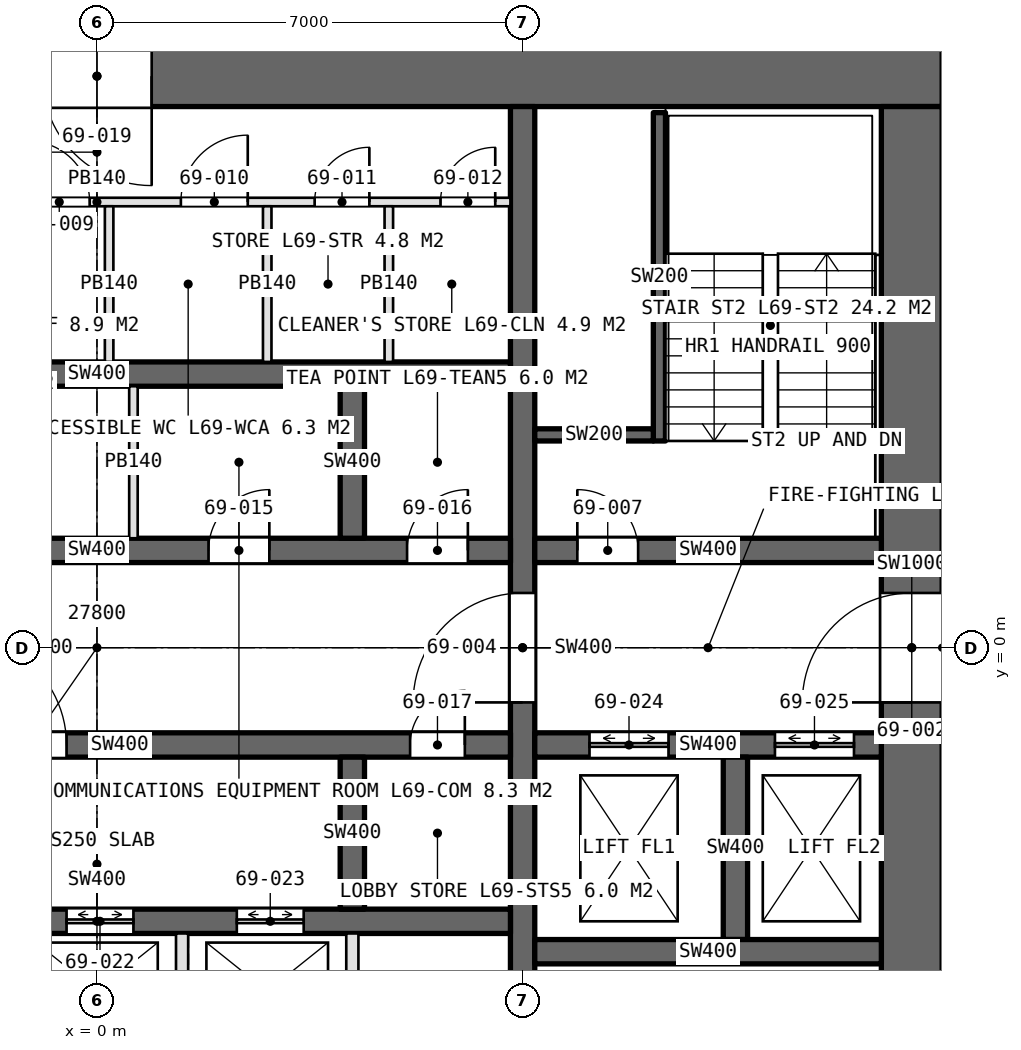
"""IFC4 building model, lengths in metres.
Left out: names, types, materials, properties, quantities, classifications, styles, units other than length and angle.
Written with IfcOpenShell. Run it as: python <this file> out.ifc"""

import sys

from ifc_helpers import new_model, si_unit, direction, frame, frame_2d, origin, place, context, subcontext, project, spatial, rectangle, extrude, element, fill, save


model = new_model("IFC4")
c1 = context("Model", 3, precision=1e-05, world=origin(), true_north=direction((0.0, 1.0)))
c2 = subcontext(c1, "Body", "Model", "MODEL_VIEW")
j1 = project(units=[si_unit("LENGTHUNIT", "METRE"), si_unit("PLANEANGLEUNIT", "RADIAN")], contexts=[c1])
p1 = place(None, origin())
s1 = spatial("IfcSite", under=j1, at=p1, CompositionType="ELEMENT")
p2 = place(p1, origin())
s2 = spatial("IfcBuilding", under=s1, at=p2, CompositionType="ELEMENT")
p3 = place(p2, frame((0.0, 0.0, 309.0)))
s3 = spatial("IfcBuildingStorey", under=s2, at=p3, CompositionType="ELEMENT", Elevation=309.0)
p4 = place(p3, frame((13.9, 9.4, 0.0), z_axis=(0.0, 0.0, 1.0), x_axis=(-1.0, 0.0, 0.0)))
e1 = element("IfcWall", 1, at=p4, inside=s3, PredefinedType="SHEAR", context=c2, shape_type="SweptSolid", body=[
    extrude(rectangle(XDim=27.8, YDim=1.0, at=frame_2d((13.9, 0.0))), origin(), (0.0, 0.0, 1.0), 4.2),
])
p5 = place(p4, frame((23.9, 0.0, 0.0)))
e2 = element("IfcOpeningElement", 2, at=p5, cuts=e1, PredefinedType="OPENING", context=c2, shape_type="SweptSolid", body=[
    extrude(rectangle(XDim=1.0, YDim=2.4, at=frame_2d((0.5, 1.2))), frame((0.0, 0.51, 0.0), z_axis=(0.0, -1.0, 0.0), x_axis=(1.0, 0.0, 0.0)), (0.0, 0.0, 1.0), 1.02),
])
p6 = place(p4, frame((13.0, 0.0, 0.0)))
e3 = element("IfcOpeningElement", 3, at=p6, cuts=e1, PredefinedType="OPENING", context=c2, shape_type="SweptSolid", body=[
    extrude(rectangle(XDim=1.8, YDim=2.4, at=frame_2d((0.9, 1.2))), frame((0.0, 0.51, 0.0), z_axis=(0.0, -1.0, 0.0), x_axis=(1.0, 0.0, 0.0)), (0.0, 0.0, 1.0), 1.02),
])
p7 = place(p3, frame((13.4, -8.9, 0.0), z_axis=(0.0, 0.0, 1.0), x_axis=(0.0, 1.0, 0.0)))
e4 = element("IfcWall", 4, at=p7, inside=s3, PredefinedType="SHEAR", context=c2, shape_type="SweptSolid", body=[
    extrude(rectangle(XDim=17.8, YDim=1.0, at=frame_2d((8.9, 0.0))), origin(), (0.0, 0.0, 1.0), 4.2),
])
p8 = place(p7, frame((8.0, 0.0, 0.0)))
e5 = element("IfcOpeningElement", 5, at=p8, cuts=e4, PredefinedType="OPENING", context=c2, shape_type="SweptSolid", body=[
    extrude(rectangle(XDim=1.8, YDim=2.4, at=frame_2d((0.9, 1.2))), frame((0.0, 0.51, 0.0), z_axis=(0.0, -1.0, 0.0), x_axis=(1.0, 0.0, 0.0)), (0.0, 0.0, 1.0), 1.02),
])
p9 = place(p3, frame((7.0, -8.9, 0.0), z_axis=(0.0, 0.0, 1.0), x_axis=(0.0, 1.0, 0.0)))
e6 = element("IfcWall", 6, at=p9, inside=s3, PredefinedType="SHEAR", context=c2, shape_type="SweptSolid", body=[
    extrude(rectangle(XDim=17.8, YDim=0.4, at=frame_2d((8.9, 0.0))), origin(), (0.0, 0.0, 1.0), 4.2),
])
p10 = place(p9, frame((8.0, 0.0, 0.0)))
e7 = element("IfcOpeningElement", 7, at=p10, cuts=e6, PredefinedType="OPENING", context=c2, shape_type="SweptSolid", body=[
    extrude(rectangle(XDim=1.8, YDim=2.4, at=frame_2d((0.9, 1.2))), frame((0.0, 0.21, 0.0), z_axis=(0.0, -1.0, 0.0), x_axis=(1.0, 0.0, 0.0)), (0.0, 0.0, 1.0), 0.42),
])
p11 = place(p3, frame((-6.8, 1.6, 0.0), z_axis=(0.0, 0.0, 1.0), x_axis=(1.0, 0.0, 0.0)))
e8 = element("IfcWall", 8, at=p11, inside=s3, PredefinedType="SHEAR", context=c2, shape_type="SweptSolid", body=[
    extrude(rectangle(XDim=13.6, YDim=0.4, at=frame_2d((6.8, 0.0))), origin(), (0.0, 0.0, 1.0), 4.2),
])
p12 = place(p11, frame((0.365, 0.0, 0.0)))
e9 = element("IfcOpeningElement", 9, at=p12, cuts=e8, PredefinedType="OPENING", context=c2, shape_type="SweptSolid", body=[
    extrude(rectangle(XDim=1.0, YDim=2.4, at=frame_2d((0.5, 1.2))), frame((0.0, 0.21, 0.0), z_axis=(0.0, -1.0, 0.0), x_axis=(1.0, 0.0, 0.0)), (0.0, 0.0, 1.0), 0.42),
])
p13 = place(p11, frame((4.1, 0.0, 0.0)))
e10 = element("IfcOpeningElement", 10, at=p13, cuts=e8, PredefinedType="OPENING", context=c2, shape_type="SweptSolid", body=[
    extrude(rectangle(XDim=1.0, YDim=2.4, at=frame_2d((0.5, 1.2))), frame((0.0, 0.21, 0.0), z_axis=(0.0, -1.0, 0.0), x_axis=(1.0, 0.0, 0.0)), (0.0, 0.0, 1.0), 0.42),
])
p14 = place(p11, frame((8.635, 0.0, 0.0)))
e11 = element("IfcOpeningElement", 11, at=p14, cuts=e8, PredefinedType="OPENING", context=c2, shape_type="SweptSolid", body=[
    extrude(rectangle(XDim=1.0, YDim=2.4, at=frame_2d((0.5, 1.2))), frame((0.0, 0.21, 0.0), z_axis=(0.0, -1.0, 0.0), x_axis=(1.0, 0.0, 0.0)), (0.0, 0.0, 1.0), 0.42),
])
p15 = place(p11, frame((11.9, 0.0, 0.0)))
e12 = element("IfcOpeningElement", 12, at=p15, cuts=e8, PredefinedType="OPENING", context=c2, shape_type="SweptSolid", body=[
    extrude(rectangle(XDim=1.0, YDim=2.4, at=frame_2d((0.5, 1.2))), frame((0.0, 0.21, 0.0), z_axis=(0.0, -1.0, 0.0), x_axis=(1.0, 0.0, 0.0)), (0.0, 0.0, 1.0), 0.42),
])
p16 = place(p3, frame((-6.8, -1.6, 0.0), z_axis=(0.0, 0.0, 1.0), x_axis=(1.0, 0.0, 0.0)))
e13 = element("IfcWall", 13, at=p16, inside=s3, PredefinedType="SHEAR", context=c2, shape_type="SweptSolid", body=[
    extrude(rectangle(XDim=13.6, YDim=0.4, at=frame_2d((6.8, 0.0))), origin(), (0.0, 0.0, 1.0), 4.2),
])
p17 = place(p16, frame((11.95, 0.0, 0.0)))
e14 = element("IfcOpeningElement", 14, at=p17, cuts=e13, PredefinedType="OPENING", context=c2, shape_type="SweptSolid", body=[
    extrude(rectangle(XDim=0.9, YDim=2.4, at=frame_2d((0.45, 1.2))), frame((0.0, 0.21, 0.0), z_axis=(0.0, -1.0, 0.0), x_axis=(1.0, 0.0, 0.0)), (0.0, 0.0, 1.0), 0.42),
])
p18 = place(p16, frame((4.5, 0.0, 0.0)))
e15 = element("IfcOpeningElement", 15, at=p18, cuts=e13, PredefinedType="OPENING", context=c2, shape_type="SweptSolid", body=[
    extrude(rectangle(XDim=1.8, YDim=2.4, at=frame_2d((0.9, 1.2))), frame((0.0, 0.21, 0.0), z_axis=(0.0, -1.0, 0.0), x_axis=(1.0, 0.0, 0.0)), (0.0, 0.0, 1.0), 0.42),
])
p19 = place(p3, frame((-6.8, 4.5, 0.0), z_axis=(0.0, 0.0, 1.0), x_axis=(1.0, 0.0, 0.0)))
e16 = element("IfcWall", 16, at=p19, inside=s3, PredefinedType="SHEAR", context=c2, shape_type="SweptSolid", body=[
    extrude(rectangle(XDim=13.6, YDim=0.4, at=frame_2d((6.8, 0.0))), origin(), (0.0, 0.0, 1.0), 4.2),
])
p20 = place(p3, frame((-6.8, -4.5, 0.0), z_axis=(0.0, 0.0, 1.0), x_axis=(1.0, 0.0, 0.0)))
e17 = element("IfcWall", 17, at=p20, inside=s3, PredefinedType="SHEAR", context=c2, shape_type="SweptSolid", body=[
    extrude(rectangle(XDim=13.6, YDim=0.4, at=frame_2d((6.8, 0.0))), origin(), (0.0, 0.0, 1.0), 4.2),
])
p21 = place(p20, frame((0.7, 0.0, 0.0)))
e18 = element("IfcOpeningElement", 18, at=p21, cuts=e17, PredefinedType="OPENING", context=c2, shape_type="SweptSolid", body=[
    extrude(rectangle(XDim=1.1, YDim=2.4, at=frame_2d((0.55, 1.2))), frame((0.0, 0.21, 0.0), z_axis=(0.0, -1.0, 0.0), x_axis=(1.0, 0.0, 0.0)), (0.0, 0.0, 1.0), 0.42),
])
p22 = place(p20, frame((3.5, 0.0, 0.0)))
e19 = element("IfcOpeningElement", 19, at=p22, cuts=e17, PredefinedType="OPENING", context=c2, shape_type="SweptSolid", body=[
    extrude(rectangle(XDim=1.1, YDim=2.4, at=frame_2d((0.55, 1.2))), frame((0.0, 0.21, 0.0), z_axis=(0.0, -1.0, 0.0), x_axis=(1.0, 0.0, 0.0)), (0.0, 0.0, 1.0), 0.42),
])
p23 = place(p20, frame((6.3, 0.0, 0.0)))
e20 = element("IfcOpeningElement", 20, at=p23, cuts=e17, PredefinedType="OPENING", context=c2, shape_type="SweptSolid", body=[
    extrude(rectangle(XDim=1.1, YDim=2.4, at=frame_2d((0.55, 1.2))), frame((0.0, 0.21, 0.0), z_axis=(0.0, -1.0, 0.0), x_axis=(1.0, 0.0, 0.0)), (0.0, 0.0, 1.0), 0.42),
])
p24 = place(p20, frame((9.1, 0.0, 0.0)))
e21 = element("IfcOpeningElement", 21, at=p24, cuts=e17, PredefinedType="OPENING", context=c2, shape_type="SweptSolid", body=[
    extrude(rectangle(XDim=1.1, YDim=2.4, at=frame_2d((0.55, 1.2))), frame((0.0, 0.21, 0.0), z_axis=(0.0, -1.0, 0.0), x_axis=(1.0, 0.0, 0.0)), (0.0, 0.0, 1.0), 0.42),
])
p25 = place(p3, frame((7.2, 1.6, 0.0), z_axis=(0.0, 0.0, 1.0), x_axis=(1.0, 0.0, 0.0)))
e22 = element("IfcWall", 22, at=p25, inside=s3, PredefinedType="SHEAR", context=c2, shape_type="SweptSolid", body=[
    extrude(rectangle(XDim=5.7, YDim=0.4, at=frame_2d((2.85, 0.0))), origin(), (0.0, 0.0, 1.0), 4.2),
])
p26 = place(p25, frame((0.7, 0.0, 0.0)))
e23 = element("IfcOpeningElement", 23, at=p26, cuts=e22, PredefinedType="OPENING", context=c2, shape_type="SweptSolid", body=[
    extrude(rectangle(XDim=1.0, YDim=2.4, at=frame_2d((0.5, 1.2))), frame((0.0, 0.21, 0.0), z_axis=(0.0, -1.0, 0.0), x_axis=(1.0, 0.0, 0.0)), (0.0, 0.0, 1.0), 0.42),
])
p27 = place(p3, frame((7.2, -1.6, 0.0), z_axis=(0.0, 0.0, 1.0), x_axis=(1.0, 0.0, 0.0)))
e24 = element("IfcWall", 24, at=p27, inside=s3, PredefinedType="SHEAR", context=c2, shape_type="SweptSolid", body=[
    extrude(rectangle(XDim=5.7, YDim=0.4, at=frame_2d((2.85, 0.0))), origin(), (0.0, 0.0, 1.0), 4.2),
])
p28 = place(p27, frame((0.9, 0.0, 0.0)))
e25 = element("IfcOpeningElement", 25, at=p28, cuts=e24, PredefinedType="OPENING", context=c2, shape_type="SweptSolid", body=[
    extrude(rectangle(XDim=1.3, YDim=2.4, at=frame_2d((0.65, 1.2))), frame((0.0, 0.21, 0.0), z_axis=(0.0, -1.0, 0.0), x_axis=(1.0, 0.0, 0.0)), (0.0, 0.0, 1.0), 0.42),
])
p29 = place(p27, frame((3.95, 0.0, 0.0)))
e26 = element("IfcOpeningElement", 26, at=p29, cuts=e24, PredefinedType="OPENING", context=c2, shape_type="SweptSolid", body=[
    extrude(rectangle(XDim=1.3, YDim=2.4, at=frame_2d((0.65, 1.2))), frame((0.0, 0.21, 0.0), z_axis=(0.0, -1.0, 0.0), x_axis=(1.0, 0.0, 0.0)), (0.0, 0.0, 1.0), 0.42),
])
p30 = place(p3, frame((10.5, -4.8, 0.0), z_axis=(0.0, 0.0, 1.0), x_axis=(0.0, 1.0, 0.0)))
e27 = element("IfcWall", 27, at=p30, inside=s3, PredefinedType="SHEAR", context=c2, shape_type="SweptSolid", body=[
    extrude(rectangle(XDim=3.0, YDim=0.4, at=frame_2d((1.5, 0.0))), origin(), (0.0, 0.0, 1.0), 4.2),
])
p31 = place(p3, frame((7.2, -5.0, 0.0), z_axis=(0.0, 0.0, 1.0), x_axis=(1.0, 0.0, 0.0)))
e28 = element("IfcWall", 28, at=p31, inside=s3, PredefinedType="SHEAR", context=c2, shape_type="SweptSolid", body=[
    extrude(rectangle(XDim=5.7, YDim=0.4, at=frame_2d((2.85, 0.0))), origin(), (0.0, 0.0, 1.0), 4.2),
])
for number, where, z_axis, x_axis in (
    (29, (4.2, 1.8, 0.0), (0.0, 0.0, 1.0), (0.0, 1.0, 0.0)),
    (30, (4.2, -4.3, 0.0), (0.0, 0.0, 1.0), (0.0, 1.0, 0.0)),
):
    element("IfcWall", number, at=place(p3, frame(where, z_axis=z_axis, x_axis=x_axis)), inside=s3, PredefinedType="SHEAR", context=c2, shape_type="SweptSolid", body=[
        extrude(rectangle(XDim=2.5, YDim=0.4, at=frame_2d((1.25, 0.0))), origin(), (0.0, 0.0, 1.0), 4.2),
    ])
p32 = place(p3, frame((-6.8, 7.33, 0.0), z_axis=(0.0, 0.0, 1.0), x_axis=(1.0, 0.0, 0.0)))
e31 = element("IfcWall", 31, at=p32, inside=s3, PredefinedType="PARTITIONING", context=c2, shape_type="SweptSolid", body=[
    extrude(rectangle(XDim=13.6, YDim=0.14, at=frame_2d((6.8, 0.0))), origin(), (0.0, 0.0, 1.0), 3.95),
])
p33 = place(p32, frame((2.08, 0.0, 0.0)))
e32 = element("IfcOpeningElement", 32, at=p33, cuts=e31, PredefinedType="OPENING", context=c2, shape_type="SweptSolid", body=[
    extrude(rectangle(XDim=1.0, YDim=2.4, at=frame_2d((0.5, 1.2))), frame((0.0, 0.08, 0.0), z_axis=(0.0, -1.0, 0.0), x_axis=(1.0, 0.0, 0.0)), (0.0, 0.0, 1.0), 0.16),
])
p34 = place(p32, frame((5.68, 0.0, 0.0)))
e33 = element("IfcOpeningElement", 33, at=p34, cuts=e31, PredefinedType="OPENING", context=c2, shape_type="SweptSolid", body=[
    extrude(rectangle(XDim=1.0, YDim=2.4, at=frame_2d((0.5, 1.2))), frame((0.0, 0.08, 0.0), z_axis=(0.0, -1.0, 0.0), x_axis=(1.0, 0.0, 0.0)), (0.0, 0.0, 1.0), 0.16),
])
p35 = place(p32, frame((8.18, 0.0, 0.0)))
e34 = element("IfcOpeningElement", 34, at=p35, cuts=e31, PredefinedType="OPENING", context=c2, shape_type="SweptSolid", body=[
    extrude(rectangle(XDim=1.1, YDim=2.4, at=frame_2d((0.55, 1.2))), frame((0.0, 0.08, 0.0), z_axis=(0.0, -1.0, 0.0), x_axis=(1.0, 0.0, 0.0)), (0.0, 0.0, 1.0), 0.16),
])
p36 = place(p32, frame((10.38, 0.0, 0.0)))
e35 = element("IfcOpeningElement", 35, at=p36, cuts=e31, PredefinedType="OPENING", context=c2, shape_type="SweptSolid", body=[
    extrude(rectangle(XDim=0.9, YDim=2.4, at=frame_2d((0.45, 1.2))), frame((0.0, 0.08, 0.0), z_axis=(0.0, -1.0, 0.0), x_axis=(1.0, 0.0, 0.0)), (0.0, 0.0, 1.0), 0.16),
])
p37 = place(p32, frame((12.45, 0.0, 0.0)))
e36 = element("IfcOpeningElement", 36, at=p37, cuts=e31, PredefinedType="OPENING", context=c2, shape_type="SweptSolid", body=[
    extrude(rectangle(XDim=0.9, YDim=2.4, at=frame_2d((0.45, 1.2))), frame((0.0, 0.08, 0.0), z_axis=(0.0, -1.0, 0.0), x_axis=(1.0, 0.0, 0.0)), (0.0, 0.0, 1.0), 0.16),
])
for number, where, z_axis, x_axis in (
    (37, (0.2, 4.7, 0.0), (0.0, 0.0, 1.0), (0.0, 1.0, 0.0)),
    (38, (2.8, 4.7, 0.0), (0.0, 0.0, 1.0), (0.0, 1.0, 0.0)),
    (39, (4.8, 4.7, 0.0), (0.0, 0.0, 1.0), (0.0, 1.0, 0.0)),
):
    element("IfcWall", number, at=place(p3, frame(where, z_axis=z_axis, x_axis=x_axis)), inside=s3, PredefinedType="PARTITIONING", context=c2, shape_type="SweptSolid", body=[
        extrude(rectangle(XDim=2.56, YDim=0.14, at=frame_2d((1.28, 0.0))), origin(), (0.0, 0.0, 1.0), 3.95),
    ])
p38 = place(p3, frame((0.6, 1.8, 0.0), z_axis=(0.0, 0.0, 1.0), x_axis=(0.0, 1.0, 0.0)))
e40 = element("IfcWall", 40, at=p38, inside=s3, PredefinedType="PARTITIONING", context=c2, shape_type="SweptSolid", body=[
    extrude(rectangle(XDim=2.5, YDim=0.14, at=frame_2d((1.25, 0.0))), origin(), (0.0, 0.0, 1.0), 3.95),
])
for number, where, z_axis, x_axis in (
    (41, (1.4, -4.7, 0.0), (0.0, 0.0, 1.0), (0.0, -1.0, 0.0)),
    (42, (4.2, -4.7, 0.0), (0.0, 0.0, 1.0), (0.0, -1.0, 0.0)),
):
    element("IfcWall", number, at=place(p3, frame(where, z_axis=z_axis, x_axis=x_axis)), inside=s3, PredefinedType="PARTITIONING", context=c2, shape_type="SweptSolid", body=[
        extrude(rectangle(XDim=4.2, YDim=0.2, at=frame_2d((2.1, 0.0))), origin(), (0.0, 0.0, 1.0), 4.2),
    ])
p39 = place(p3, frame((9.25, 3.4, 0.0), z_axis=(0.0, 0.0, 1.0), x_axis=(0.0, 1.0, 0.0)))
e43 = element("IfcWall", 43, at=p39, inside=s3, PredefinedType="SOLIDWALL", context=c2, shape_type="SweptSolid", body=[
    extrude(rectangle(XDim=5.4, YDim=0.2, at=frame_2d((2.7, 0.0))), origin(), (0.0, 0.0, 1.0), 4.2),
])
p40 = place(p3, frame((9.15, 3.5, 0.0), z_axis=(0.0, 0.0, 1.0), x_axis=(-1.0, 0.0, 0.0)))
e44 = element("IfcWall", 44, at=p40, inside=s3, PredefinedType="SOLIDWALL", context=c2, shape_type="SweptSolid", body=[
    extrude(rectangle(XDim=1.95, YDim=0.2, at=frame_2d((0.975, 0.0))), origin(), (0.0, 0.0, 1.0), 4.2),
])
p41 = place(p3, frame((13.92, 4.006, 0.0), z_axis=(0.0, 0.0, 1.0), x_axis=(0.960105665242, 0.279637464534, 0.0)))
e45 = element("IfcWall", 45, at=p41, inside=s3, PredefinedType="PARTITIONING", context=c2, shape_type="SweptSolid", body=[
    extrude(rectangle(XDim=8.12, YDim=0.15, at=frame_2d((4.06, 0.0))), origin(), (0.0, 0.0, 1.0), 3.0),
])
p42 = place(p8, origin())
e46 = element("IfcDoor", 46, at=p42, inside=s3, OperationType="DOUBLE_DOOR_SINGLE_SWING", PredefinedType="DOOR", context=c2, shape_type="SweptSolid", body=[
    extrude(rectangle(XDim=1.8, YDim=2.4, at=frame_2d((0.9, 1.2))), frame((0.0, 0.025, 0.0), z_axis=(0.0, -1.0, 0.0), x_axis=(1.0, 0.0, 0.0)), (0.0, 0.0, 1.0), 0.05),
])
fill(e5, e46)
p43 = place(p10, origin())
e47 = element("IfcDoor", 47, at=p43, inside=s3, OperationType="DOUBLE_DOOR_SINGLE_SWING", PredefinedType="DOOR", context=c2, shape_type="SweptSolid", body=[
    extrude(rectangle(XDim=1.8, YDim=2.4, at=frame_2d((0.9, 1.2))), frame((0.0, 0.025, 0.0), z_axis=(0.0, -1.0, 0.0), x_axis=(1.0, 0.0, 0.0)), (0.0, 0.0, 1.0), 0.05),
])
fill(e7, e47)
p44 = place(p26, origin())
e48 = element("IfcDoor", 48, at=p44, inside=s3, OperationType="SINGLE_SWING_LEFT", PredefinedType="DOOR", context=c2, shape_type="SweptSolid", body=[
    extrude(rectangle(XDim=1.0, YDim=2.4, at=frame_2d((0.5, 1.2))), frame((0.0, 0.025, 0.0), z_axis=(0.0, -1.0, 0.0), x_axis=(1.0, 0.0, 0.0)), (0.0, 0.0, 1.0), 0.05),
])
fill(e23, e48)
p45 = place(p34, origin())
e49 = element("IfcDoor", 49, at=p45, inside=s3, OperationType="SINGLE_SWING_LEFT", PredefinedType="DOOR", context=c2, shape_type="SweptSolid", body=[
    extrude(rectangle(XDim=1.0, YDim=2.4, at=frame_2d((0.5, 1.2))), frame((0.0, 0.025, 0.0), z_axis=(0.0, -1.0, 0.0), x_axis=(1.0, 0.0, 0.0)), (0.0, 0.0, 1.0), 0.05),
])
fill(e33, e49)
p46 = place(p35, origin())
e50 = element("IfcDoor", 50, at=p46, inside=s3, OperationType="SINGLE_SWING_RIGHT", PredefinedType="DOOR", context=c2, shape_type="SweptSolid", body=[
    extrude(rectangle(XDim=1.1, YDim=2.4, at=frame_2d((0.55, 1.2))), frame((0.0, 0.025, 0.0), z_axis=(0.0, -1.0, 0.0), x_axis=(1.0, 0.0, 0.0)), (0.0, 0.0, 1.0), 0.05),
])
fill(e34, e50)
p47 = place(p36, origin())
e51 = element("IfcDoor", 51, at=p47, inside=s3, OperationType="SINGLE_SWING_RIGHT", PredefinedType="DOOR", context=c2, shape_type="SweptSolid", body=[
    extrude(rectangle(XDim=0.9, YDim=2.4, at=frame_2d((0.45, 1.2))), frame((0.0, 0.025, 0.0), z_axis=(0.0, -1.0, 0.0), x_axis=(1.0, 0.0, 0.0)), (0.0, 0.0, 1.0), 0.05),
])
fill(e35, e51)
p48 = place(p37, origin())
e52 = element("IfcDoor", 52, at=p48, inside=s3, OperationType="SINGLE_SWING_RIGHT", PredefinedType="DOOR", context=c2, shape_type="SweptSolid", body=[
    extrude(rectangle(XDim=0.9, YDim=2.4, at=frame_2d((0.45, 1.2))), frame((0.0, 0.025, 0.0), z_axis=(0.0, -1.0, 0.0), x_axis=(1.0, 0.0, 0.0)), (0.0, 0.0, 1.0), 0.05),
])
fill(e36, e52)
p49 = place(p14, origin())
e53 = element("IfcDoor", 53, at=p49, inside=s3, OperationType="SINGLE_SWING_RIGHT", PredefinedType="DOOR", context=c2, shape_type="SweptSolid", body=[
    extrude(rectangle(XDim=1.0, YDim=2.4, at=frame_2d((0.5, 1.2))), frame((0.0, 0.025, 0.0), z_axis=(0.0, -1.0, 0.0), x_axis=(1.0, 0.0, 0.0)), (0.0, 0.0, 1.0), 0.05),
])
fill(e11, e53)
p50 = place(p15, origin())
e54 = element("IfcDoor", 54, at=p50, inside=s3, OperationType="SINGLE_SWING_RIGHT", PredefinedType="DOOR", context=c2, shape_type="SweptSolid", body=[
    extrude(rectangle(XDim=1.0, YDim=2.4, at=frame_2d((0.5, 1.2))), frame((0.0, 0.025, 0.0), z_axis=(0.0, -1.0, 0.0), x_axis=(1.0, 0.0, 0.0)), (0.0, 0.0, 1.0), 0.05),
])
fill(e12, e54)
p51 = place(p17, origin())
e55 = element("IfcDoor", 55, at=p51, inside=s3, OperationType="SINGLE_SWING_RIGHT", PredefinedType="DOOR", context=c2, shape_type="SweptSolid", body=[
    extrude(rectangle(XDim=0.9, YDim=2.4, at=frame_2d((0.45, 1.2))), frame((0.0, 0.025, 0.0), z_axis=(0.0, -1.0, 0.0), x_axis=(1.0, 0.0, 0.0)), (0.0, 0.0, 1.0), 0.05),
])
fill(e14, e55)
p52 = place(p18, origin())
e56 = element("IfcDoor", 56, at=p52, inside=s3, OperationType="DOUBLE_DOOR_SINGLE_SWING", PredefinedType="DOOR", context=c2, shape_type="SweptSolid", body=[
    extrude(rectangle(XDim=1.8, YDim=2.4, at=frame_2d((0.9, 1.2))), frame((0.0, 0.025, 0.0), z_axis=(0.0, -1.0, 0.0), x_axis=(1.0, 0.0, 0.0)), (0.0, 0.0, 1.0), 0.05),
])
fill(e15, e56)
p53 = place(p6, origin())
e57 = element("IfcDoor", 57, at=p53, inside=s3, OperationType="DOUBLE_DOOR_SINGLE_SWING", PredefinedType="DOOR", context=c2, shape_type="SweptSolid", body=[
    extrude(rectangle(XDim=1.8, YDim=2.4, at=frame_2d((0.9, 1.2))), frame((0.0, 0.025, 0.0), z_axis=(0.0, -1.0, 0.0), x_axis=(1.0, 0.0, 0.0)), (0.0, 0.0, 1.0), 0.05),
])
fill(e3, e57)
p54 = place(p23, origin())
e58 = element("IfcDoor", 58, at=p54, inside=s3, OperationType="DOUBLE_DOOR_SLIDING", PredefinedType="DOOR", context=c2, shape_type="SweptSolid", body=[
    extrude(rectangle(XDim=1.1, YDim=2.4, at=frame_2d((0.55, 1.2))), frame((0.0, 0.025, 0.0), z_axis=(0.0, -1.0, 0.0), x_axis=(1.0, 0.0, 0.0)), (0.0, 0.0, 1.0), 0.05),
])
fill(e20, e58)
p55 = place(p24, origin())
e59 = element("IfcDoor", 59, at=p55, inside=s3, OperationType="DOUBLE_DOOR_SLIDING", PredefinedType="DOOR", context=c2, shape_type="SweptSolid", body=[
    extrude(rectangle(XDim=1.1, YDim=2.4, at=frame_2d((0.55, 1.2))), frame((0.0, 0.025, 0.0), z_axis=(0.0, -1.0, 0.0), x_axis=(1.0, 0.0, 0.0)), (0.0, 0.0, 1.0), 0.05),
])
fill(e21, e59)
p56 = place(p28, origin())
e60 = element("IfcDoor", 60, at=p56, inside=s3, OperationType="DOUBLE_DOOR_SLIDING", PredefinedType="DOOR", context=c2, shape_type="SweptSolid", body=[
    extrude(rectangle(XDim=1.3, YDim=2.4, at=frame_2d((0.65, 1.2))), frame((0.0, 0.025, 0.0), z_axis=(0.0, -1.0, 0.0), x_axis=(1.0, 0.0, 0.0)), (0.0, 0.0, 1.0), 0.05),
])
fill(e25, e60)
p57 = place(p29, origin())
e61 = element("IfcDoor", 61, at=p57, inside=s3, OperationType="DOUBLE_DOOR_SLIDING", PredefinedType="DOOR", context=c2, shape_type="SweptSolid", body=[
    extrude(rectangle(XDim=1.3, YDim=2.4, at=frame_2d((0.65, 1.2))), frame((0.0, 0.025, 0.0), z_axis=(0.0, -1.0, 0.0), x_axis=(1.0, 0.0, 0.0)), (0.0, 0.0, 1.0), 0.05),
])
fill(e26, e61)
save(model, sys.argv[1])
